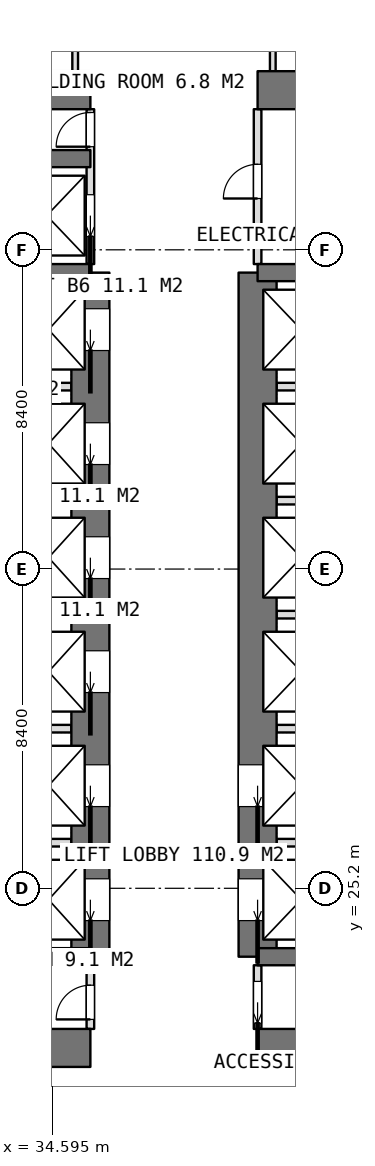
"""IFC4 building model, lengths in metres.
Left out: names, types, materials, properties, quantities, classifications, styles, units other than length and angle.
Written with IfcOpenShell. Run it as: python <this file> out.ifc"""

import sys

from ifc_helpers import new_model, si_unit, direction, frame, frame_2d, origin, place, context, subcontext, project, spatial, rectangle, extrude, element, fill, save


model = new_model("IFC4")
c1 = context("Model", 3, precision=1e-05, world=origin(), true_north=direction((0.0, 1.0)))
c2 = subcontext(c1, "Body", "Model", "MODEL_VIEW")
j1 = project(units=[si_unit("LENGTHUNIT", "METRE"), si_unit("PLANEANGLEUNIT", "RADIAN")], contexts=[c1])
p1 = place(None, origin())
s1 = spatial("IfcSite", under=j1, at=p1, CompositionType="ELEMENT")
p2 = place(p1, origin())
s2 = spatial("IfcBuilding", under=s1, at=p2, CompositionType="ELEMENT")
p3 = place(p2, frame((0.0, 0.0, 90.8)))
s3 = spatial("IfcBuildingStorey", under=s2, at=p3, CompositionType="ELEMENT", Elevation=90.8)
p4 = place(p3, frame((25.2, 21.0, 0.0), z_axis=(0.0, 0.0, 1.0), x_axis=(1.0, 0.0, 0.0)))
e1 = element("IfcWall", 1, at=p4, inside=s3, PredefinedType="SHEAR", context=c2, shape_type="SweptSolid", body=[
    extrude(rectangle(XDim=10.4, YDim=1.0, at=frame_2d((5.2, 0.0))), origin(), (0.0, 0.0, 1.0), 4.5),
])
p5 = place(p3, frame((40.0, 21.0, 0.0), z_axis=(0.0, 0.0, 1.0), x_axis=(1.0, 0.0, 0.0)))
e2 = element("IfcWall", 2, at=p5, inside=s3, PredefinedType="SHEAR", context=c2, shape_type="SweptSolid", body=[
    extrude(rectangle(XDim=10.4, YDim=1.0, at=frame_2d((5.2, 0.0))), origin(), (0.0, 0.0, 1.0), 4.5),
])
p6 = place(p3, frame((25.2, 46.2, 0.0), z_axis=(0.0, 0.0, 1.0), x_axis=(1.0, 0.0, 0.0)))
e3 = element("IfcWall", 3, at=p6, inside=s3, PredefinedType="SHEAR", context=c2, shape_type="SweptSolid", body=[
    extrude(rectangle(XDim=10.4, YDim=1.0, at=frame_2d((5.2, 0.0))), origin(), (0.0, 0.0, 1.0), 4.5),
])
p7 = place(p3, frame((40.0, 46.2, 0.0), z_axis=(0.0, 0.0, 1.0), x_axis=(1.0, 0.0, 0.0)))
e4 = element("IfcWall", 4, at=p7, inside=s3, PredefinedType="SHEAR", context=c2, shape_type="SweptSolid", body=[
    extrude(rectangle(XDim=10.4, YDim=1.0, at=frame_2d((5.2, 0.0))), origin(), (0.0, 0.0, 1.0), 4.5),
])
p8 = place(p3, frame((35.6, 23.4, 0.0), z_axis=(0.0, 0.0, 1.0), x_axis=(0.0, 1.0, 0.0)))
e5 = element("IfcWall", 5, at=p8, inside=s3, PredefinedType="SHEAR", context=c2, shape_type="SweptSolid", body=[
    extrude(rectangle(XDim=18.0, YDim=1.0, at=frame_2d((9.0, 0.0))), origin(), (0.0, 0.0, 1.0), 4.5),
])
p9 = place(p8, frame((0.95, 0.0, 0.0)))
e6 = element("IfcOpeningElement", 6, at=p9, cuts=e5, PredefinedType="OPENING", context=c2, shape_type="SweptSolid", body=[
    extrude(rectangle(XDim=1.1, YDim=2.1, at=frame_2d((0.55, 1.05))), frame((0.0, 0.51, 0.0), z_axis=(0.0, -1.0, 0.0), x_axis=(1.0, 0.0, 0.0)), (0.0, 0.0, 1.0), 1.02),
])
p10 = place(p8, frame((3.95, 0.0, 0.0)))
e7 = element("IfcOpeningElement", 7, at=p10, cuts=e5, PredefinedType="OPENING", context=c2, shape_type="SweptSolid", body=[
    extrude(rectangle(XDim=1.1, YDim=2.1, at=frame_2d((0.55, 1.05))), frame((0.0, 0.51, 0.0), z_axis=(0.0, -1.0, 0.0), x_axis=(1.0, 0.0, 0.0)), (0.0, 0.0, 1.0), 1.02),
])
p11 = place(p8, frame((6.95, 0.0, 0.0)))
e8 = element("IfcOpeningElement", 8, at=p11, cuts=e5, PredefinedType="OPENING", context=c2, shape_type="SweptSolid", body=[
    extrude(rectangle(XDim=1.1, YDim=2.1, at=frame_2d((0.55, 1.05))), frame((0.0, 0.51, 0.0), z_axis=(0.0, -1.0, 0.0), x_axis=(1.0, 0.0, 0.0)), (0.0, 0.0, 1.0), 1.02),
])
p12 = place(p8, frame((9.95, 0.0, 0.0)))
e9 = element("IfcOpeningElement", 9, at=p12, cuts=e5, PredefinedType="OPENING", context=c2, shape_type="SweptSolid", body=[
    extrude(rectangle(XDim=1.1, YDim=2.1, at=frame_2d((0.55, 1.05))), frame((0.0, 0.51, 0.0), z_axis=(0.0, -1.0, 0.0), x_axis=(1.0, 0.0, 0.0)), (0.0, 0.0, 1.0), 1.02),
])
p13 = place(p8, frame((12.95, 0.0, 0.0)))
e10 = element("IfcOpeningElement", 10, at=p13, cuts=e5, PredefinedType="OPENING", context=c2, shape_type="SweptSolid", body=[
    extrude(rectangle(XDim=1.1, YDim=2.1, at=frame_2d((0.55, 1.05))), frame((0.0, 0.51, 0.0), z_axis=(0.0, -1.0, 0.0), x_axis=(1.0, 0.0, 0.0)), (0.0, 0.0, 1.0), 1.02),
])
p14 = place(p8, frame((15.95, 0.0, 0.0)))
e11 = element("IfcOpeningElement", 11, at=p14, cuts=e5, PredefinedType="OPENING", context=c2, shape_type="SweptSolid", body=[
    extrude(rectangle(XDim=1.1, YDim=2.1, at=frame_2d((0.55, 1.05))), frame((0.0, 0.51, 0.0), z_axis=(0.0, -1.0, 0.0), x_axis=(1.0, 0.0, 0.0)), (0.0, 0.0, 1.0), 1.02),
])
p15 = place(p3, frame((40.0, 23.4, 0.0), z_axis=(0.0, 0.0, 1.0), x_axis=(0.0, 1.0, 0.0)))
e12 = element("IfcWall", 12, at=p15, inside=s3, PredefinedType="SHEAR", context=c2, shape_type="SweptSolid", body=[
    extrude(rectangle(XDim=18.0, YDim=1.0, at=frame_2d((9.0, 0.0))), origin(), (0.0, 0.0, 1.0), 4.5),
])
p16 = place(p15, frame((0.95, 0.0, 0.0)))
e13 = element("IfcOpeningElement", 13, at=p16, cuts=e12, PredefinedType="OPENING", context=c2, shape_type="SweptSolid", body=[
    extrude(rectangle(XDim=1.1, YDim=2.1, at=frame_2d((0.55, 1.05))), frame((0.0, 0.51, 0.0), z_axis=(0.0, -1.0, 0.0), x_axis=(1.0, 0.0, 0.0)), (0.0, 0.0, 1.0), 1.02),
])
p17 = place(p15, frame((3.95, 0.0, 0.0)))
e14 = element("IfcOpeningElement", 14, at=p17, cuts=e12, PredefinedType="OPENING", context=c2, shape_type="SweptSolid", body=[
    extrude(rectangle(XDim=1.1, YDim=2.1, at=frame_2d((0.55, 1.05))), frame((0.0, 0.51, 0.0), z_axis=(0.0, -1.0, 0.0), x_axis=(1.0, 0.0, 0.0)), (0.0, 0.0, 1.0), 1.02),
])
for number, where, z_axis, x_axis in (
    (15, (31.8, 23.4, 0.0), (0.0, 0.0, 1.0), (1.0, 0.0, 0.0)),
    (16, (31.8, 41.4, 0.0), (0.0, 0.0, 1.0), (1.0, 0.0, 0.0)),
    (17, (31.8, 44.4, 0.0), (0.0, 0.0, 1.0), (1.0, 0.0, 0.0)),
    (18, (40.0, 23.4, 0.0), (0.0, 0.0, 1.0), (1.0, 0.0, 0.0)),
    (19, (40.0, 41.4, 0.0), (0.0, 0.0, 1.0), (1.0, 0.0, 0.0)),
):
    element("IfcWall", number, at=place(p3, frame(where, z_axis=z_axis, x_axis=x_axis)), inside=s3, PredefinedType="SHEAR", context=c2, shape_type="SweptSolid", body=[
        extrude(rectangle(XDim=3.8, YDim=0.45, at=frame_2d((1.9, 0.0))), origin(), (0.0, 0.0, 1.0), 4.5),
    ])
for number, where, z_axis, x_axis in (
    (20, (32.025, 26.4, 0.0), (0.0, 0.0, 1.0), (1.0, 0.0, 0.0)),
    (21, (32.025, 29.4, 0.0), (0.0, 0.0, 1.0), (1.0, 0.0, 0.0)),
    (22, (32.025, 32.4, 0.0), (0.0, 0.0, 1.0), (1.0, 0.0, 0.0)),
    (23, (32.025, 35.4, 0.0), (0.0, 0.0, 1.0), (1.0, 0.0, 0.0)),
    (24, (32.025, 38.4, 0.0), (0.0, 0.0, 1.0), (1.0, 0.0, 0.0)),
):
    element("IfcWall", number, at=place(p3, frame(where, z_axis=z_axis, x_axis=x_axis)), inside=s3, PredefinedType="PARTITIONING", context=c2, shape_type="SweptSolid", body=[
        extrude(rectangle(XDim=3.075, YDim=0.2, at=frame_2d((1.538, 0.0))), origin(), (0.0, 0.0, 1.0), 4.25),
    ])
for number, where, z_axis, x_axis in (
    (25, (40.5, 26.4, 0.0), (0.0, 0.0, 1.0), (1.0, 0.0, 0.0)),
    (26, (40.5, 29.4, 0.0), (0.0, 0.0, 1.0), (1.0, 0.0, 0.0)),
    (27, (40.5, 32.4, 0.0), (0.0, 0.0, 1.0), (1.0, 0.0, 0.0)),
    (28, (40.5, 35.4, 0.0), (0.0, 0.0, 1.0), (1.0, 0.0, 0.0)),
    (29, (40.5, 38.4, 0.0), (0.0, 0.0, 1.0), (1.0, 0.0, 0.0)),
):
    element("IfcWall", number, at=place(p3, frame(where, z_axis=z_axis, x_axis=x_axis)), inside=s3, PredefinedType="PARTITIONING", context=c2, shape_type="SweptSolid", body=[
        extrude(rectangle(XDim=3.075, YDim=0.2, at=frame_2d((1.538, 0.0))), origin(), (0.0, 0.0, 1.0), 4.25),
    ])
p18 = place(p3, frame((40.0, 21.5, 0.0), z_axis=(0.0, 0.0, 1.0), x_axis=(0.0, 1.0, 0.0)))
e30 = element("IfcWall", 30, at=p18, inside=s3, PredefinedType="PARTITIONING", context=c2, shape_type="SweptSolid", body=[
    extrude(rectangle(XDim=1.675, YDim=0.2, at=frame_2d((0.837, 0.0))), origin(), (0.0, 0.0, 1.0), 4.25),
])
p19 = place(p18, frame((0.15, 0.0, 0.0)))
e31 = element("IfcOpeningElement", 31, at=p19, cuts=e30, PredefinedType="OPENING", context=c2, shape_type="SweptSolid", body=[
    extrude(rectangle(XDim=1.1, YDim=2.1, at=frame_2d((0.55, 1.05))), frame((0.0, 0.11, 0.0), z_axis=(0.0, -1.0, 0.0), x_axis=(1.0, 0.0, 0.0)), (0.0, 0.0, 1.0), 0.22),
])
p20 = place(p3, frame((40.0, 41.625, 0.0), z_axis=(0.0, 0.0, 1.0), x_axis=(0.0, 1.0, 0.0)))
e32 = element("IfcWall", 32, at=p20, inside=s3, PredefinedType="PARTITIONING", context=c2, shape_type="SweptSolid", body=[
    extrude(rectangle(XDim=4.075, YDim=0.2, at=frame_2d((2.038, 0.0))), origin(), (0.0, 0.0, 1.0), 4.25),
])
p21 = place(p20, frame((1.725, 0.0, 0.0)))
e33 = element("IfcOpeningElement", 33, at=p21, cuts=e32, PredefinedType="OPENING", context=c2, shape_type="SweptSolid", body=[
    extrude(rectangle(XDim=0.9, YDim=2.1, at=frame_2d((0.45, 1.05))), frame((0.0, 0.11, 0.0), z_axis=(0.0, -1.0, 0.0), x_axis=(1.0, 0.0, 0.0)), (0.0, 0.0, 1.0), 0.22),
])
p22 = place(p3, frame((35.6, 41.625, 0.0), z_axis=(0.0, 0.0, 1.0), x_axis=(0.0, 1.0, 0.0)))
e34 = element("IfcWall", 34, at=p22, inside=s3, PredefinedType="PARTITIONING", context=c2, shape_type="SweptSolid", body=[
    extrude(rectangle(XDim=4.075, YDim=0.2, at=frame_2d((2.038, 0.0))), origin(), (0.0, 0.0, 1.0), 4.25),
])
p23 = place(p22, frame((3.088, 0.0, 0.0)))
e35 = element("IfcOpeningElement", 35, at=p23, cuts=e34, PredefinedType="OPENING", context=c2, shape_type="SweptSolid", body=[
    extrude(rectangle(XDim=0.9, YDim=2.1, at=frame_2d((0.45, 1.05))), frame((0.0, 0.11, 0.0), z_axis=(0.0, -1.0, 0.0), x_axis=(1.0, 0.0, 0.0)), (0.0, 0.0, 1.0), 0.22),
])
p24 = place(p22, frame((0.725, 0.0, 0.0)))
e36 = element("IfcOpeningElement", 36, at=p24, cuts=e34, PredefinedType="OPENING", context=c2, shape_type="SweptSolid", body=[
    extrude(rectangle(XDim=1.1, YDim=2.1, at=frame_2d((0.55, 1.05))), frame((0.0, 0.11, 0.0), z_axis=(0.0, -1.0, 0.0), x_axis=(1.0, 0.0, 0.0)), (0.0, 0.0, 1.0), 0.22),
])
p25 = place(p3, frame((35.6, 21.5, 0.0), z_axis=(0.0, 0.0, 1.0), x_axis=(0.0, 1.0, 0.0)))
e37 = element("IfcWall", 37, at=p25, inside=s3, PredefinedType="PARTITIONING", context=c2, shape_type="SweptSolid", body=[
    extrude(rectangle(XDim=1.675, YDim=0.2, at=frame_2d((0.837, 0.0))), origin(), (0.0, 0.0, 1.0), 4.25),
])
p26 = place(p25, frame((0.25, 0.0, 0.0)))
e38 = element("IfcOpeningElement", 38, at=p26, cuts=e37, PredefinedType="OPENING", context=c2, shape_type="SweptSolid", body=[
    extrude(rectangle(XDim=0.9, YDim=2.1, at=frame_2d((0.45, 1.05))), frame((0.0, 0.11, 0.0), z_axis=(0.0, -1.0, 0.0), x_axis=(1.0, 0.0, 0.0)), (0.0, 0.0, 1.0), 0.22),
])
for number, where, z_axis, x_axis in (
    (39, (40.4, 46.7, 0.0), (0.0, 0.0, 1.0), (0.0, 1.0, 0.0)),
    (40, (35.2, 46.7, 0.0), (0.0, 0.0, 1.0), (0.0, 1.0, 0.0)),
):
    element("IfcWall", number, at=place(p3, frame(where, z_axis=z_axis, x_axis=x_axis)), inside=s3, PredefinedType="PARTITIONING", context=c2, shape_type="SweptSolid", body=[
        extrude(rectangle(XDim=2.625, YDim=0.15, at=frame_2d((1.312, 0.0))), origin(), (0.0, 0.0, 1.0), 4.25),
    ])
p27 = place(p19, origin())
e41 = element("IfcDoor", 41, at=p27, inside=s3, OperationType="SLIDING_TO_LEFT", PredefinedType="DOOR", context=c2, shape_type="SweptSolid", body=[
    extrude(rectangle(XDim=1.1, YDim=2.1, at=frame_2d((0.55, 1.05))), frame((0.0, 0.025, 0.0), z_axis=(0.0, -1.0, 0.0), x_axis=(1.0, 0.0, 0.0)), (0.0, 0.0, 1.0), 0.05),
])
fill(e31, e41)
p28 = place(p26, origin())
e42 = element("IfcDoor", 42, at=p28, inside=s3, OperationType="SINGLE_SWING_LEFT", PredefinedType="DOOR", context=c2, shape_type="SweptSolid", body=[
    extrude(rectangle(XDim=0.9, YDim=2.1, at=frame_2d((0.45, 1.05))), frame((0.0, 0.025, 0.0), z_axis=(0.0, -1.0, 0.0), x_axis=(1.0, 0.0, 0.0)), (0.0, 0.0, 1.0), 0.05),
])
fill(e38, e42)
p29 = place(p21, origin())
e43 = element("IfcDoor", 43, at=p29, inside=s3, OperationType="SINGLE_SWING_LEFT", PredefinedType="DOOR", context=c2, shape_type="SweptSolid", body=[
    extrude(rectangle(XDim=0.9, YDim=2.1, at=frame_2d((0.45, 1.05))), frame((0.0, 0.025, 0.0), z_axis=(0.0, -1.0, 0.0), x_axis=(1.0, 0.0, 0.0)), (0.0, 0.0, 1.0), 0.05),
])
fill(e33, e43)
p30 = place(p23, origin())
e44 = element("IfcDoor", 44, at=p30, inside=s3, OperationType="SINGLE_SWING_LEFT", PredefinedType="DOOR", context=c2, shape_type="SweptSolid", body=[
    extrude(rectangle(XDim=0.9, YDim=2.1, at=frame_2d((0.45, 1.05))), frame((0.0, 0.025, 0.0), z_axis=(0.0, -1.0, 0.0), x_axis=(1.0, 0.0, 0.0)), (0.0, 0.0, 1.0), 0.05),
])
fill(e35, e44)
p31 = place(p9, origin())
e45 = element("IfcDoor", 45, at=p31, inside=s3, OperationType="SLIDING_TO_LEFT", PredefinedType="USERDEFINED", context=c2, shape_type="SweptSolid", body=[
    extrude(rectangle(XDim=1.1, YDim=2.1, at=frame_2d((0.55, 1.05))), frame((0.0, 0.025, 0.0), z_axis=(0.0, -1.0, 0.0), x_axis=(1.0, 0.0, 0.0)), (0.0, 0.0, 1.0), 0.05),
])
fill(e6, e45)
p32 = place(p10, origin())
e46 = element("IfcDoor", 46, at=p32, inside=s3, OperationType="SLIDING_TO_LEFT", PredefinedType="USERDEFINED", context=c2, shape_type="SweptSolid", body=[
    extrude(rectangle(XDim=1.1, YDim=2.1, at=frame_2d((0.55, 1.05))), frame((0.0, 0.025, 0.0), z_axis=(0.0, -1.0, 0.0), x_axis=(1.0, 0.0, 0.0)), (0.0, 0.0, 1.0), 0.05),
])
fill(e7, e46)
p33 = place(p11, origin())
e47 = element("IfcDoor", 47, at=p33, inside=s3, OperationType="SLIDING_TO_LEFT", PredefinedType="USERDEFINED", context=c2, shape_type="SweptSolid", body=[
    extrude(rectangle(XDim=1.1, YDim=2.1, at=frame_2d((0.55, 1.05))), frame((0.0, 0.025, 0.0), z_axis=(0.0, -1.0, 0.0), x_axis=(1.0, 0.0, 0.0)), (0.0, 0.0, 1.0), 0.05),
])
fill(e8, e47)
p34 = place(p12, origin())
e48 = element("IfcDoor", 48, at=p34, inside=s3, OperationType="SLIDING_TO_LEFT", PredefinedType="USERDEFINED", context=c2, shape_type="SweptSolid", body=[
    extrude(rectangle(XDim=1.1, YDim=2.1, at=frame_2d((0.55, 1.05))), frame((0.0, 0.025, 0.0), z_axis=(0.0, -1.0, 0.0), x_axis=(1.0, 0.0, 0.0)), (0.0, 0.0, 1.0), 0.05),
])
fill(e9, e48)
p35 = place(p13, origin())
e49 = element("IfcDoor", 49, at=p35, inside=s3, OperationType="SLIDING_TO_LEFT", PredefinedType="USERDEFINED", context=c2, shape_type="SweptSolid", body=[
    extrude(rectangle(XDim=1.1, YDim=2.1, at=frame_2d((0.55, 1.05))), frame((0.0, 0.025, 0.0), z_axis=(0.0, -1.0, 0.0), x_axis=(1.0, 0.0, 0.0)), (0.0, 0.0, 1.0), 0.05),
])
fill(e10, e49)
p36 = place(p14, origin())
e50 = element("IfcDoor", 50, at=p36, inside=s3, OperationType="SLIDING_TO_LEFT", PredefinedType="USERDEFINED", context=c2, shape_type="SweptSolid", body=[
    extrude(rectangle(XDim=1.1, YDim=2.1, at=frame_2d((0.55, 1.05))), frame((0.0, 0.025, 0.0), z_axis=(0.0, -1.0, 0.0), x_axis=(1.0, 0.0, 0.0)), (0.0, 0.0, 1.0), 0.05),
])
fill(e11, e50)
p37 = place(p16, origin())
e51 = element("IfcDoor", 51, at=p37, inside=s3, OperationType="SLIDING_TO_LEFT", PredefinedType="USERDEFINED", context=c2, shape_type="SweptSolid", body=[
    extrude(rectangle(XDim=1.1, YDim=2.1, at=frame_2d((0.55, 1.05))), frame((0.0, 0.025, 0.0), z_axis=(0.0, -1.0, 0.0), x_axis=(1.0, 0.0, 0.0)), (0.0, 0.0, 1.0), 0.05),
])
fill(e13, e51)
p38 = place(p17, origin())
e52 = element("IfcDoor", 52, at=p38, inside=s3, OperationType="SLIDING_TO_LEFT", PredefinedType="USERDEFINED", context=c2, shape_type="SweptSolid", body=[
    extrude(rectangle(XDim=1.1, YDim=2.1, at=frame_2d((0.55, 1.05))), frame((0.0, 0.025, 0.0), z_axis=(0.0, -1.0, 0.0), x_axis=(1.0, 0.0, 0.0)), (0.0, 0.0, 1.0), 0.05),
])
fill(e14, e52)
p39 = place(p24, origin())
e53 = element("IfcDoor", 53, at=p39, inside=s3, OperationType="SLIDING_TO_LEFT", PredefinedType="USERDEFINED", context=c2, shape_type="SweptSolid", body=[
    extrude(rectangle(XDim=1.1, YDim=2.1, at=frame_2d((0.55, 1.05))), frame((0.0, 0.025, 0.0), z_axis=(0.0, -1.0, 0.0), x_axis=(1.0, 0.0, 0.0)), (0.0, 0.0, 1.0), 0.05),
])
fill(e36, e53)
save(model, sys.argv[1])
